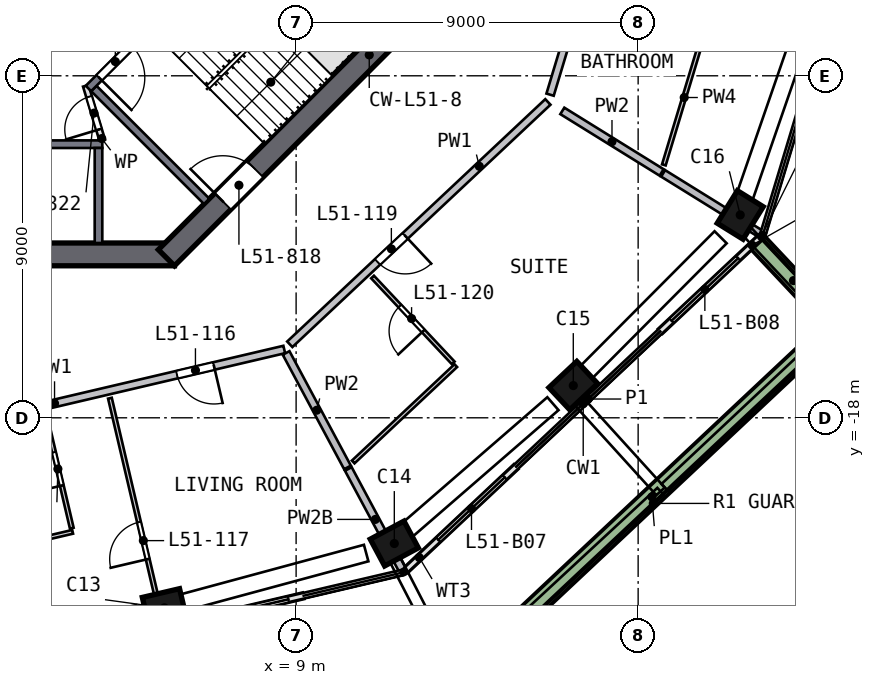
"""IFC4 building model, lengths in metres.
Left out: names, types, materials, properties, quantities, classifications, styles, units other than length and angle.
Written with IfcOpenShell. Run it as: python <this file> out.ifc"""

import sys

from ifc_helpers import new_model, si_unit, direction, frame, frame_2d, origin, origin_2d, place, context, subcontext, project, spatial, rectangle, extrude, element, fill, save


model = new_model("IFC4")
c1 = context("Model", 3, precision=1e-05, world=origin(), true_north=direction((0.0, 1.0)))
c2 = subcontext(c1, "Body", "Model", "MODEL_VIEW")
j1 = project(units=[si_unit("LENGTHUNIT", "METRE"), si_unit("PLANEANGLEUNIT", "RADIAN")], contexts=[c1])
p1 = place(None, origin())
s1 = spatial("IfcSite", under=j1, at=p1, CompositionType="ELEMENT")
p2 = place(p1, origin())
s2 = spatial("IfcBuilding", under=s1, at=p2, CompositionType="ELEMENT")
p3 = place(p2, frame((0.0, 0.0, 209.0)))
s3 = spatial("IfcBuildingStorey", under=s2, at=p3, CompositionType="ELEMENT", Elevation=209.0)
p4 = place(p3, frame((5.402, -23.033, 0.0), z_axis=(0.109357343, 0.026616878, 0.99364607), x_axis=(0.967420011, 0.226786103, -0.112545929)))
e1 = element("IfcColumn", 1, at=p4, inside=s3, PredefinedType="COLUMN", context=c2, shape_type="SweptSolid", body=[
    extrude(rectangle(XDim=1.0, YDim=0.8, at=origin_2d()), origin(), (0.0, 0.0, 1.0), 3.21),
])
p5 = place(p3, frame((11.462, -21.376, 0.0), z_axis=(0.101187651, 0.055345312, 0.993326711), x_axis=(-0.875501932, -0.469249686, 0.115330388)))
e2 = element("IfcColumn", 2, at=p5, inside=s3, PredefinedType="COLUMN", context=c2, shape_type="SweptSolid", body=[
    extrude(rectangle(XDim=1.0, YDim=0.8, at=origin_2d()), origin(), (0.0, 0.0, 1.0), 3.211),
])
p6 = place(p3, frame((16.195, -17.246, 0.0), z_axis=(0.081371824, 0.077721499, 0.993648829), x_axis=(0.724346074, 0.68019237, -0.112521575)))
e3 = element("IfcColumn", 3, at=p6, inside=s3, PredefinedType="COLUMN", context=c2, shape_type="SweptSolid", body=[
    extrude(rectangle(XDim=1.0, YDim=0.8, at=origin_2d()), origin(), (0.0, 0.0, 1.0), 3.21),
])
p7 = place(p3, frame((20.614, -12.781, 0.0), z_axis=(0.059906909, 0.0985271, 0.993329539), x_axis=(-0.523250609, -0.844341944, 0.115306034)))
e4 = element("IfcColumn", 4, at=p7, inside=s3, PredefinedType="COLUMN", context=c2, shape_type="SweptSolid", body=[
    extrude(rectangle(XDim=1.0, YDim=0.8, at=origin_2d()), origin(), (0.0, 0.0, 1.0), 3.211),
])
p8 = place(p3, frame((-5.799, -13.7, 0.0), z_axis=(0.0, 0.0, 1.0), x_axis=(1.0, 0.0, 0.0)))
e5 = element("IfcWall", 5, at=p8, inside=s3, PredefinedType="SHEAR", context=c2, shape_type="SweptSolid", body=[
    extrude(rectangle(XDim=11.598, YDim=0.6, at=frame_2d((5.799, 0.0))), origin(), (0.0, 0.0, 1.0), 3.5),
])
p9 = place(p3, frame((5.587, -13.788, 0.0), z_axis=(0.0, 0.0, 1.0), x_axis=(0.707106781, 0.707106781, 0.0)))
e6 = element("IfcWall", 6, at=p9, inside=s3, PredefinedType="SHEAR", context=c2, shape_type="SweptSolid", body=[
    extrude(rectangle(XDim=11.598, YDim=0.6, at=frame_2d((5.799, 0.0))), origin(), (0.0, 0.0, 1.0), 3.5),
])
p10 = place(p9, frame((2.099, 0.0, 0.0)))
e7 = element("IfcOpeningElement", 7, at=p10, cuts=e6, PredefinedType="OPENING", context=c2, shape_type="SweptSolid", body=[
    extrude(rectangle(XDim=1.2, YDim=2.1, at=frame_2d((0.6, 1.05))), frame((0.0, 0.31, 0.0), z_axis=(0.0, -1.0, 0.0), x_axis=(1.0, 0.0, 0.0)), (0.0, 0.0, 1.0), 0.62),
])
p11 = place(p3, frame((5.522, -23.544, 0.0), z_axis=(0.0, 0.0, 1.0), x_axis=(0.973578668, 0.228351874, 0.0)))
e8 = element("IfcWall", 8, at=p11, inside=s3, PredefinedType="SOLIDWALL", context=c2, shape_type="SweptSolid", body=[
    extrude(rectangle(XDim=3.761, YDim=0.15, at=frame_2d((1.881, 0.0))), origin(), (0.0, 0.0, 1.0), 2.475),
])
p12 = place(p11, frame((0.961, 0.0, 0.0)))
e9 = element("IfcOpeningElement", 9, at=p12, cuts=e8, PredefinedType="OPENING", context=c2, shape_type="SweptSolid", body=[
    extrude(rectangle(XDim=2.4, YDim=2.4, at=frame_2d((1.2, 1.2))), frame((0.0, 0.085, 0.0), z_axis=(0.0, -1.0, 0.0), x_axis=(1.0, 0.0, 0.0)), (0.0, 0.0, 1.0), 0.17),
])
p13 = place(p3, frame((11.889, -22.01, 0.0), z_axis=(0.0, 0.0, 1.0), x_axis=(0.729003464, 0.684510006, 0.0)))
e10 = element("IfcWall", 10, at=p13, inside=s3, PredefinedType="SOLIDWALL", context=c2, shape_type="SweptSolid", body=[
    extrude(rectangle(XDim=3.967, YDim=0.15, at=frame_2d((1.984, 0.0))), origin(), (0.0, 0.0, 1.0), 2.475),
])
p14 = place(p13, frame((1.167, 0.0, 0.0)))
e11 = element("IfcOpeningElement", 11, at=p14, cuts=e10, PredefinedType="OPENING", context=c2, shape_type="SweptSolid", body=[
    extrude(rectangle(XDim=2.4, YDim=2.4, at=frame_2d((1.2, 1.2))), frame((0.0, 0.085, 0.0), z_axis=(0.0, -1.0, 0.0), x_axis=(1.0, 0.0, 0.0)), (0.0, 0.0, 1.0), 0.17),
])
p15 = place(p3, frame((18.589, -15.718, 0.0), z_axis=(0.0, 0.0, 1.0), x_axis=(0.728948321, 0.684568729, 0.0)))
e12 = element("IfcWall", 12, at=p15, inside=s3, PredefinedType="SOLIDWALL", context=c2, shape_type="SweptSolid", body=[
    extrude(rectangle(XDim=3.609, YDim=0.15, at=frame_2d((1.804, 0.0))), origin(), (0.0, 0.0, 1.0), 2.475),
])
p16 = place(p15, frame((0.4, 0.0, 0.0)))
e13 = element("IfcOpeningElement", 13, at=p16, cuts=e12, PredefinedType="OPENING", context=c2, shape_type="SweptSolid", body=[
    extrude(rectangle(XDim=2.4, YDim=2.4, at=frame_2d((1.2, 1.2))), frame((0.0, 0.085, 0.0), z_axis=(0.0, -1.0, 0.0), x_axis=(1.0, 0.0, 0.0)), (0.0, 0.0, 1.0), 0.17),
])
p17 = place(p3, frame((13.36, -24.779, 0.0), z_axis=(0.0, 0.0, 1.0), x_axis=(0.728977188, 0.68453799, 0.0)))
e14 = element("IfcWall", 14, at=p17, inside=s3, PredefinedType="SOLIDWALL", context=c2, shape_type="SweptSolid", body=[
    extrude(rectangle(XDim=13.724, YDim=0.5, at=frame_2d((6.862, 0.0))), origin(), (0.0, 0.0, 1.0), 0.7),
])
p18 = place(p3, frame((23.01, -15.373, 0.0), z_axis=(0.0, 0.0, 1.0), x_axis=(-0.684551685, 0.728964327, 0.0)))
e15 = element("IfcWall", 15, at=p18, inside=s3, PredefinedType="SOLIDWALL", context=c2, shape_type="SweptSolid", body=[
    extrude(rectangle(XDim=2.699, YDim=0.5, at=frame_2d((1.35, 0.0))), origin(), (0.0, 0.0, 1.0), 0.7),
])
p19 = place(p3, frame((-3.9, -10.8, 0.0), z_axis=(0.0, 0.0, 1.0), x_axis=(1.0, 0.0, 0.0)))
e16 = element("IfcWall", 16, at=p19, inside=s3, PredefinedType="SOLIDWALL", context=c2, shape_type="SweptSolid", body=[
    extrude(rectangle(XDim=7.8, YDim=0.2, at=frame_2d((3.9, 0.0))), origin(), (0.0, 0.0, 1.0), 3.19),
])
p20 = place(p19, frame((3.45, 0.0, 0.0)))
e17 = element("IfcOpeningElement", 17, at=p20, cuts=e16, PredefinedType="OPENING", context=c2, shape_type="SweptSolid", body=[
    extrude(rectangle(XDim=0.9, YDim=2.1, at=frame_2d((0.45, 1.05))), frame((0.0, 0.11, 0.0), z_axis=(0.0, -1.0, 0.0), x_axis=(1.0, 0.0, 0.0)), (0.0, 0.0, 1.0), 0.22),
])
p21 = place(p3, frame((3.8, -10.9, 0.0), z_axis=(0.0, 0.0, 1.0), x_axis=(0.0, -1.0, 0.0)))
e18 = element("IfcWall", 18, at=p21, inside=s3, PredefinedType="SOLIDWALL", context=c2, shape_type="SweptSolid", body=[
    extrude(rectangle(XDim=2.5, YDim=0.2, at=frame_2d((1.25, 0.0))), origin(), (0.0, 0.0, 1.0), 3.19),
])
p22 = place(p3, frame((9.629, -3.24, 0.0), z_axis=(0.0, 0.0, 1.0), x_axis=(-0.707120946, -0.707092617, 0.0)))
e19 = element("IfcWall", 19, at=p22, inside=s3, PredefinedType="SOLIDWALL", context=c2, shape_type="SweptSolid", body=[
    extrude(rectangle(XDim=8.618, YDim=0.2, at=frame_2d((4.309, 0.0))), origin(), (0.0, 0.0, 1.0), 3.19),
])
p23 = place(p22, frame((7.018, 0.0, 0.0)))
e20 = element("IfcOpeningElement", 20, at=p23, cuts=e19, PredefinedType="OPENING", context=c2, shape_type="SweptSolid", body=[
    extrude(rectangle(XDim=1.2, YDim=2.1, at=frame_2d((0.6, 1.05))), frame((0.0, 0.11, 0.0), z_axis=(0.0, -1.0, 0.0), x_axis=(1.0, 0.0, 0.0)), (0.0, 0.0, 1.0), 0.22),
])
p24 = place(p3, frame((3.677, -9.334, 0.0), z_axis=(0.0, 0.0, 1.0), x_axis=(0.707077716, -0.707135845, 0.0)))
e21 = element("IfcWall", 21, at=p24, inside=s3, PredefinedType="SOLIDWALL", context=c2, shape_type="SweptSolid", body=[
    extrude(rectangle(XDim=4.2, YDim=0.2, at=frame_2d((2.1, 0.0))), origin(), (0.0, 0.0, 1.0), 3.19),
])
p25 = place(p3, frame((3.9, -10.7, 0.0), z_axis=(0.0, 0.0, 1.0), x_axis=(-0.289808785, 0.957084567, 0.0)))
e22 = element("IfcWall", 22, at=p25, inside=s3, PredefinedType="PARTITIONING", context=c2, shape_type="SweptSolid", body=[
    extrude(rectangle(XDim=1.501, YDim=0.15, at=frame_2d((0.75, 0.0))), origin(), (0.0, 0.0, 1.0), 3.19),
])
p26 = place(p25, frame((0.301, 0.0, 0.0)))
e23 = element("IfcOpeningElement", 23, at=p26, cuts=e22, PredefinedType="OPENING", context=c2, shape_type="SweptSolid", body=[
    extrude(rectangle(XDim=0.9, YDim=2.1, at=frame_2d((0.45, 1.05))), frame((0.0, 0.085, 0.0), z_axis=(0.0, -1.0, 0.0), x_axis=(1.0, 0.0, 0.0)), (0.0, 0.0, 1.0), 0.17),
])
p27 = place(p3, frame((8.688, -16.203, 0.0), z_axis=(0.0, 0.0, 1.0), x_axis=(-0.97357982, -0.228346959, 0.0)))
e24 = element("IfcWall", 24, at=p27, inside=s3, PredefinedType="SOLIDWALL", context=c2, shape_type="SweptSolid", body=[
    extrude(rectangle(XDim=9.317, YDim=0.2, at=frame_2d((4.658, 0.0))), origin(), (0.0, 0.0, 1.0), 3.19),
])
p28 = place(p27, frame((1.9, 0.0, 0.0)))
e25 = element("IfcOpeningElement", 25, at=p28, cuts=e24, PredefinedType="OPENING", context=c2, shape_type="SweptSolid", body=[
    extrude(rectangle(XDim=1.0, YDim=2.1, at=frame_2d((0.5, 1.05))), frame((0.0, 0.11, 0.0), z_axis=(0.0, -1.0, 0.0), x_axis=(1.0, 0.0, 0.0)), (0.0, 0.0, 1.0), 0.22),
])
p29 = place(p3, frame((15.625, -9.688, 0.0), z_axis=(0.0, 0.0, 1.0), x_axis=(-0.728966545, -0.684549323, 0.0)))
e26 = element("IfcWall", 26, at=p29, inside=s3, PredefinedType="SOLIDWALL", context=c2, shape_type="SweptSolid", body=[
    extrude(rectangle(XDim=9.317, YDim=0.2, at=frame_2d((4.658, 0.0))), origin(), (0.0, 0.0, 1.0), 3.19),
])
p30 = place(p29, frame((5.15, 0.0, 0.0)))
e27 = element("IfcOpeningElement", 27, at=p30, cuts=e26, PredefinedType="OPENING", context=c2, shape_type="SweptSolid", body=[
    extrude(rectangle(XDim=1.0, YDim=2.1, at=frame_2d((0.5, 1.05))), frame((0.0, 0.11, 0.0), z_axis=(0.0, -1.0, 0.0), x_axis=(1.0, 0.0, 0.0)), (0.0, 0.0, 1.0), 0.22),
])
p31 = place(p3, frame((18.376, -0.577, 0.0), z_axis=(0.0, 0.0, 1.0), x_axis=(-0.289032685, -0.957319229, 0.0)))
e28 = element("IfcWall", 28, at=p31, inside=s3, PredefinedType="SOLIDWALL", context=c2, shape_type="SweptSolid", body=[
    extrude(rectangle(XDim=9.317, YDim=0.2, at=frame_2d((4.658, 0.0))), origin(), (0.0, 0.0, 1.0), 3.19),
])
p32 = place(p31, frame((5.15, 0.0, 0.0)))
e29 = element("IfcOpeningElement", 29, at=p32, cuts=e28, PredefinedType="OPENING", context=c2, shape_type="SweptSolid", body=[
    extrude(rectangle(XDim=1.0, YDim=2.1, at=frame_2d((0.5, 1.05))), frame((0.0, 0.11, 0.0), z_axis=(0.0, -1.0, 0.0), x_axis=(1.0, 0.0, 0.0)), (0.0, 0.0, 1.0), 0.22),
])
p33 = place(p3, frame((8.737, -16.294, 0.0), z_axis=(0.0, 0.0, 1.0), x_axis=(0.472514711, -0.881322783, 0.0)))
e30 = element("IfcWall", 30, at=p33, inside=s3, PredefinedType="SOLIDWALL", context=c2, shape_type="SweptSolid", body=[
    extrude(rectangle(XDim=3.418, YDim=0.2, at=frame_2d((1.709, 0.0))), origin(), (0.0, 0.0, 1.0), 3.19),
])
p34 = place(p3, frame((10.374, -19.347, 0.0), z_axis=(0.0, 0.0, 1.0), x_axis=(0.472552084, -0.881302745, 0.0)))
e31 = element("IfcWall", 31, at=p34, inside=s3, PredefinedType="SOLIDWALL", context=c2, shape_type="SweptSolid", body=[
    extrude(rectangle(XDim=3.011, YDim=0.2, at=frame_2d((1.506, 0.0))), origin(), (0.0, 0.0, 1.0), 2.69),
])
p35 = place(p3, frame((16.005, -9.924, 0.0), z_axis=(0.0, 0.0, 1.0), x_axis=(0.849884201, -0.526969492, 0.0)))
e32 = element("IfcWall", 32, at=p35, inside=s3, PredefinedType="SOLIDWALL", context=c2, shape_type="SweptSolid", body=[
    extrude(rectangle(XDim=3.075, YDim=0.2, at=frame_2d((1.538, 0.0))), origin(), (0.0, 0.0, 1.0), 3.19),
])
p36 = place(p3, frame((18.657, -11.568, 0.0), z_axis=(0.0, 0.0, 1.0), x_axis=(0.849919394, -0.526912729, 0.0)))
e33 = element("IfcWall", 33, at=p36, inside=s3, PredefinedType="SOLIDWALL", context=c2, shape_type="SweptSolid", body=[
    extrude(rectangle(XDim=3.011, YDim=0.2, at=frame_2d((1.506, 0.0))), origin(), (0.0, 0.0, 1.0), 3.19),
])
p37 = place(p3, frame((-0.487, -21.847, 0.0), z_axis=(0.0, 0.0, 1.0), x_axis=(0.973571675, 0.228381684, 0.0)))
e34 = element("IfcWall", 34, at=p37, inside=s3, PredefinedType="PARTITIONING", context=c2, shape_type="SweptSolid", body=[
    extrude(rectangle(XDim=3.704, YDim=0.1, at=frame_2d((1.852, 0.0))), origin(), (0.0, 0.0, 1.0), 3.19),
])
p38 = place(p3, frame((3.097, -20.904, 0.0), z_axis=(0.0, 0.0, 1.0), x_axis=(-0.228314969, 0.973587323, 0.0)))
e35 = element("IfcWall", 35, at=p38, inside=s3, PredefinedType="PARTITIONING", context=c2, shape_type="SweptSolid", body=[
    extrude(rectangle(XDim=3.1, YDim=0.1, at=frame_2d((1.55, 0.0))), origin(), (0.0, 0.0, 1.0), 3.19),
])
p39 = place(p38, frame((1.15, 0.0, 0.0)))
e36 = element("IfcOpeningElement", 36, at=p39, cuts=e35, PredefinedType="OPENING", context=c2, shape_type="SweptSolid", body=[
    extrude(rectangle(XDim=0.9, YDim=2.1, at=frame_2d((0.45, 1.05))), frame((0.0, 0.06, 0.0), z_axis=(0.0, -1.0, 0.0), x_axis=(1.0, 0.0, 0.0)), (0.0, 0.0, 1.0), 0.12),
])
p40 = place(p3, frame((5.505, -23.471, 0.0), z_axis=(0.0, 0.0, 1.0), x_axis=(-0.228340078, 0.973581434, 0.0)))
e37 = element("IfcWall", 37, at=p40, inside=s3, PredefinedType="PARTITIONING", context=c2, shape_type="SweptSolid", body=[
    extrude(rectangle(XDim=6.15, YDim=0.1, at=frame_2d((3.075, 0.0))), origin(), (0.0, 0.0, 1.0), 3.19),
])
p41 = place(p40, frame((1.8, 0.0, 0.0)))
e38 = element("IfcOpeningElement", 38, at=p41, cuts=e37, PredefinedType="OPENING", context=c2, shape_type="SweptSolid", body=[
    extrude(rectangle(XDim=1.0, YDim=2.1, at=frame_2d((0.5, 1.05))), frame((0.0, 0.06, 0.0), z_axis=(0.0, -1.0, 0.0), x_axis=(1.0, 0.0, 0.0)), (0.0, 0.0, 1.0), 0.12),
])
p42 = place(p3, frame((13.202, -16.627, 0.0), z_axis=(0.0, 0.0, 1.0), x_axis=(-0.728969657, -0.684546009, 0.0)))
e39 = element("IfcWall", 39, at=p42, inside=s3, PredefinedType="PARTITIONING", context=c2, shape_type="SweptSolid", body=[
    extrude(rectangle(XDim=3.704, YDim=0.1, at=frame_2d((1.852, 0.0))), origin(), (0.0, 0.0, 1.0), 3.19),
])
p43 = place(p3, frame((13.134, -16.554, 0.0), z_axis=(0.0, 0.0, 1.0), x_axis=(-0.684548673, 0.728967156, 0.0)))
e40 = element("IfcWall", 40, at=p43, inside=s3, PredefinedType="PARTITIONING", context=c2, shape_type="SweptSolid", body=[
    extrude(rectangle(XDim=3.1, YDim=0.1, at=frame_2d((1.55, 0.0))), origin(), (0.0, 0.0, 1.0), 3.19),
])
p44 = place(p43, frame((1.15, 0.0, 0.0)))
e41 = element("IfcOpeningElement", 41, at=p44, cuts=e40, PredefinedType="OPENING", context=c2, shape_type="SweptSolid", body=[
    extrude(rectangle(XDim=0.9, YDim=2.1, at=frame_2d((0.45, 1.05))), frame((0.0, 0.06, 0.0), z_axis=(0.0, -1.0, 0.0), x_axis=(1.0, 0.0, 0.0)), (0.0, 0.0, 1.0), 0.12),
])
p45 = place(p3, frame((19.747, -7.799, 0.0), z_axis=(0.0, 0.0, 1.0), x_axis=(-0.289028527, -0.957320485, 0.0)))
e42 = element("IfcWall", 42, at=p45, inside=s3, PredefinedType="PARTITIONING", context=c2, shape_type="SweptSolid", body=[
    extrude(rectangle(XDim=3.704, YDim=0.1, at=frame_2d((1.852, 0.0))), origin(), (0.0, 0.0, 1.0), 3.19),
])
p46 = place(p12, origin())
e43 = element("IfcDoor", 43, at=p46, inside=s3, OperationType="SLIDING_TO_LEFT", PredefinedType="DOOR", context=c2, shape_type="SweptSolid", body=[
    extrude(rectangle(XDim=2.4, YDim=2.4, at=frame_2d((1.2, 1.2))), frame((0.0, 0.025, 0.0), z_axis=(0.0, -1.0, 0.0), x_axis=(1.0, 0.0, 0.0)), (0.0, 0.0, 1.0), 0.05),
])
fill(e9, e43)
p47 = place(p14, origin())
e44 = element("IfcDoor", 44, at=p47, inside=s3, OperationType="SLIDING_TO_LEFT", PredefinedType="DOOR", context=c2, shape_type="SweptSolid", body=[
    extrude(rectangle(XDim=2.4, YDim=2.4, at=frame_2d((1.2, 1.2))), frame((0.0, 0.025, 0.0), z_axis=(0.0, -1.0, 0.0), x_axis=(1.0, 0.0, 0.0)), (0.0, 0.0, 1.0), 0.05),
])
fill(e11, e44)
p48 = place(p16, origin())
e45 = element("IfcDoor", 45, at=p48, inside=s3, OperationType="SLIDING_TO_RIGHT", PredefinedType="DOOR", context=c2, shape_type="SweptSolid", body=[
    extrude(rectangle(XDim=2.4, YDim=2.4, at=frame_2d((1.2, 1.2))), frame((0.0, 0.025, 0.0), z_axis=(0.0, -1.0, 0.0), x_axis=(1.0, 0.0, 0.0)), (0.0, 0.0, 1.0), 0.05),
])
fill(e13, e45)
p49 = place(p23, origin())
e46 = element("IfcDoor", 46, at=p49, inside=s3, OperationType="SINGLE_SWING_RIGHT", PredefinedType="DOOR", context=c2, shape_type="SweptSolid", body=[
    extrude(rectangle(XDim=1.2, YDim=2.1, at=frame_2d((0.6, 1.05))), frame((0.0, 0.025, 0.0), z_axis=(0.0, -1.0, 0.0), x_axis=(1.0, 0.0, 0.0)), (0.0, 0.0, 1.0), 0.05),
])
fill(e20, e46)
p50 = place(p10, origin())
e47 = element("IfcDoor", 47, at=p50, inside=s3, OperationType="SINGLE_SWING_LEFT", PredefinedType="DOOR", context=c2, shape_type="SweptSolid", body=[
    extrude(rectangle(XDim=1.2, YDim=2.1, at=frame_2d((0.6, 1.05))), frame((0.0, 0.025, 0.0), z_axis=(0.0, -1.0, 0.0), x_axis=(1.0, 0.0, 0.0)), (0.0, 0.0, 1.0), 0.05),
])
fill(e7, e47)
p51 = place(p26, origin())
e48 = element("IfcDoor", 48, at=p51, inside=s3, OperationType="SINGLE_SWING_LEFT", PredefinedType="DOOR", context=c2, shape_type="SweptSolid", body=[
    extrude(rectangle(XDim=0.9, YDim=2.1, at=frame_2d((0.45, 1.05))), frame((0.0, 0.025, 0.0), z_axis=(0.0, -1.0, 0.0), x_axis=(1.0, 0.0, 0.0)), (0.0, 0.0, 1.0), 0.05),
])
fill(e23, e48)
p52 = place(p28, origin())
e49 = element("IfcDoor", 49, at=p52, inside=s3, OperationType="SINGLE_SWING_LEFT", PredefinedType="DOOR", context=c2, shape_type="SweptSolid", body=[
    extrude(rectangle(XDim=1.0, YDim=2.1, at=frame_2d((0.5, 1.05))), frame((0.0, 0.025, 0.0), z_axis=(0.0, -1.0, 0.0), x_axis=(1.0, 0.0, 0.0)), (0.0, 0.0, 1.0), 0.05),
])
fill(e25, e49)
p53 = place(p41, origin())
e50 = element("IfcDoor", 50, at=p53, inside=s3, OperationType="SINGLE_SWING_LEFT", PredefinedType="DOOR", context=c2, shape_type="SweptSolid", body=[
    extrude(rectangle(XDim=1.0, YDim=2.1, at=frame_2d((0.5, 1.05))), frame((0.0, 0.025, 0.0), z_axis=(0.0, -1.0, 0.0), x_axis=(1.0, 0.0, 0.0)), (0.0, 0.0, 1.0), 0.05),
])
fill(e38, e50)
p54 = place(p39, origin())
e51 = element("IfcDoor", 51, at=p54, inside=s3, OperationType="SINGLE_SWING_LEFT", PredefinedType="DOOR", context=c2, shape_type="SweptSolid", body=[
    extrude(rectangle(XDim=0.9, YDim=2.1, at=frame_2d((0.45, 1.05))), frame((0.0, 0.025, 0.0), z_axis=(0.0, -1.0, 0.0), x_axis=(1.0, 0.0, 0.0)), (0.0, 0.0, 1.0), 0.05),
])
fill(e36, e51)
p55 = place(p30, origin())
e52 = element("IfcDoor", 52, at=p55, inside=s3, OperationType="SINGLE_SWING_LEFT", PredefinedType="DOOR", context=c2, shape_type="SweptSolid", body=[
    extrude(rectangle(XDim=1.0, YDim=2.1, at=frame_2d((0.5, 1.05))), frame((0.0, 0.025, 0.0), z_axis=(0.0, -1.0, 0.0), x_axis=(1.0, 0.0, 0.0)), (0.0, 0.0, 1.0), 0.05),
])
fill(e27, e52)
p56 = place(p44, origin())
e53 = element("IfcDoor", 53, at=p56, inside=s3, OperationType="SINGLE_SWING_LEFT", PredefinedType="DOOR", context=c2, shape_type="SweptSolid", body=[
    extrude(rectangle(XDim=0.9, YDim=2.1, at=frame_2d((0.45, 1.05))), frame((0.0, 0.025, 0.0), z_axis=(0.0, -1.0, 0.0), x_axis=(1.0, 0.0, 0.0)), (0.0, 0.0, 1.0), 0.05),
])
fill(e41, e53)
save(model, sys.argv[1])
